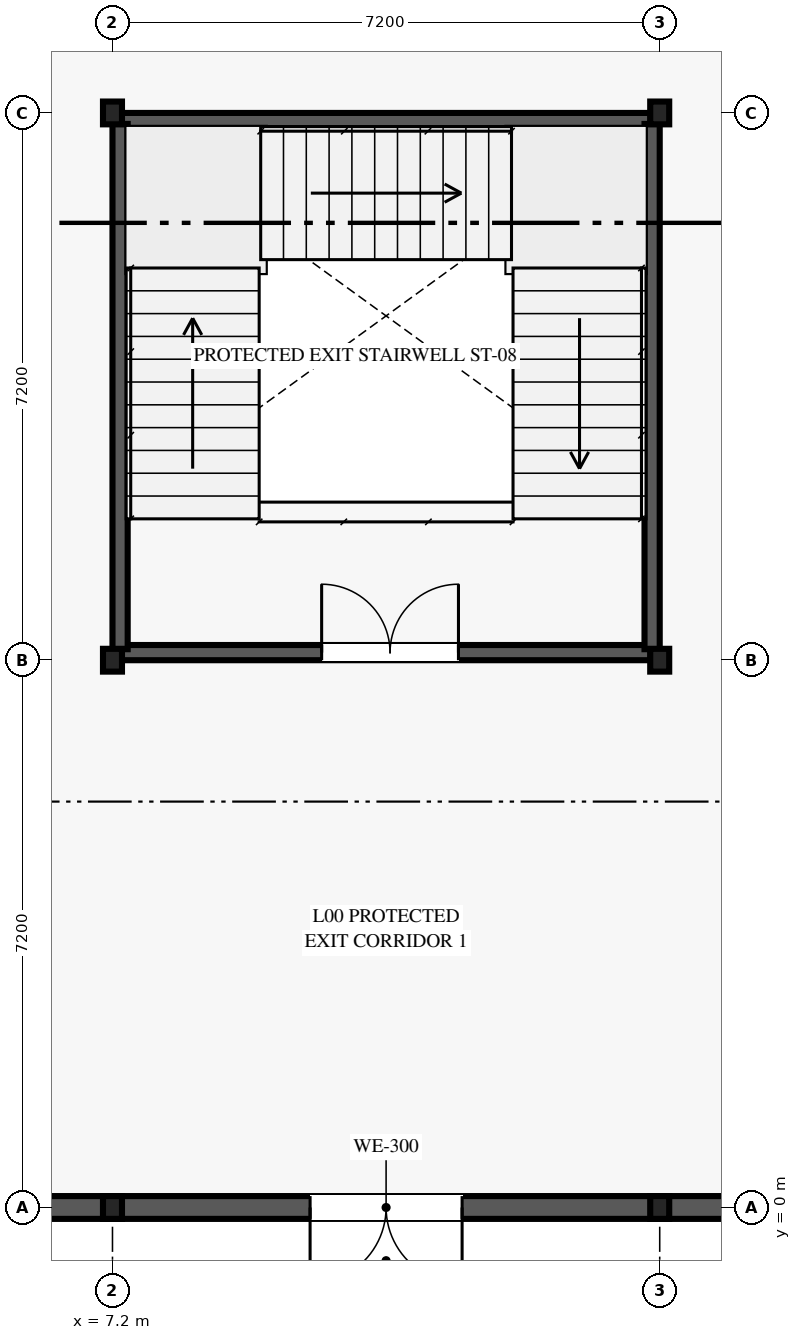
"""IFC4 building model, lengths in metres.
Left out: names, types, materials, properties, quantities, classifications, styles, units other than length and angle.
Written with IfcOpenShell. Run it as: python <this file> out.ifc"""

import sys

from ifc_helpers import new_model, si_unit, direction, frame, frame_2d, origin, origin_2d, place, context, subcontext, project, spatial, rectangle, i_section, extrude, element, fill, save


model = new_model("IFC4")
c1 = context("Model", 3, precision=1e-05, world=origin(), true_north=direction((0.0, 1.0)))
c2 = subcontext(c1, "Body", "Model", "MODEL_VIEW")
j1 = project(units=[si_unit("LENGTHUNIT", "METRE"), si_unit("PLANEANGLEUNIT", "RADIAN")], contexts=[c1])
p1 = place(None, origin())
s1 = spatial("IfcSite", under=j1, at=p1, CompositionType="ELEMENT")
p2 = place(p1, origin())
s2 = spatial("IfcBuilding", under=s1, at=p2, CompositionType="ELEMENT")
p3 = place(p2, origin())
s3 = spatial("IfcBuildingStorey", under=s2, at=p3, CompositionType="ELEMENT", Elevation=0.0)
for number, where, z_axis, x_axis in (
    (1, (7.2, 0.0, 0.0), (0.0, 0.0, 1.0), (1.0, 0.0, 0.0)),
    (2, (7.2, 7.2, 0.0), (0.0, 0.0, 1.0), (1.0, 0.0, 0.0)),
    (3, (7.2, 14.4, 0.0), (0.0, 0.0, 1.0), (1.0, 0.0, 0.0)),
    (4, (14.4, 0.0, 0.0), (0.0, 0.0, 1.0), (1.0, 0.0, 0.0)),
    (5, (14.4, 7.2, 0.0), (0.0, 0.0, 1.0), (1.0, 0.0, 0.0)),
    (6, (14.4, 14.4, 0.0), (0.0, 0.0, 1.0), (1.0, 0.0, 0.0)),
):
    element("IfcColumn", number, at=place(p3, frame(where, z_axis=z_axis, x_axis=x_axis)), inside=s3, PredefinedType="COLUMN", context=c2, shape_type="SweptSolid", body=[
        extrude(i_section(OverallWidth=0.25, OverallDepth=0.3, WebThickness=0.01, FlangeThickness=0.01, at=origin_2d()), origin(), (0.0, 0.0, 1.0), 5.4),
    ])
p4 = place(p3, frame((0.01, 0.0, 0.0), z_axis=(0.0, 0.0, 1.0), x_axis=(1.0, 0.0, 0.0)))
e7 = element("IfcWall", 7, at=p4, inside=s3, PredefinedType="SOLIDWALL", context=c2, shape_type="SweptSolid", body=[
    extrude(rectangle(XDim=7.18, YDim=0.3, at=frame_2d((3.59, 0.0))), origin(), (0.0, 0.0, 1.0), 5.16),
])
p5 = place(p4, frame((2.99, 0.0, 1.85)))
e8 = element("IfcOpeningElement", 8, at=p5, cuts=e7, PredefinedType="OPENING", context=c2, shape_type="SweptSolid", body=[
    extrude(rectangle(XDim=1.2, YDim=0.65, at=frame_2d((0.6, 0.325))), frame((0.0, 0.16, 0.0), z_axis=(0.0, -1.0, 0.0), x_axis=(1.0, 0.0, 0.0)), (0.0, 0.0, 1.0), 0.32),
])
p6 = place(p3, frame((14.39, 0.0, 0.0), z_axis=(0.0, 0.0, 1.0), x_axis=(-1.0, 0.0, 0.0)))
e9 = element("IfcWall", 9, at=p6, inside=s3, PredefinedType="SOLIDWALL", context=c2, shape_type="SweptSolid", body=[
    extrude(rectangle(XDim=7.18, YDim=0.3, at=frame_2d((3.59, 0.0))), origin(), (0.0, 0.0, 1.0), 5.16),
])
p7 = place(p6, frame((2.59, 0.0, 0.0)))
e10 = element("IfcOpeningElement", 10, at=p7, cuts=e9, PredefinedType="OPENING", context=c2, shape_type="SweptSolid", body=[
    extrude(rectangle(XDim=2.0, YDim=2.3, at=frame_2d((1.0, 1.15))), frame((0.0, 0.16, 0.0), z_axis=(0.0, -1.0, 0.0), x_axis=(1.0, 0.0, 0.0)), (0.0, 0.0, 1.0), 0.32),
])
p8 = place(p3, frame((14.41, 0.0, 0.0), z_axis=(0.0, 0.0, 1.0), x_axis=(1.0, 0.0, 0.0)))
e11 = element("IfcWall", 11, at=p8, inside=s3, PredefinedType="SOLIDWALL", context=c2, shape_type="SweptSolid", body=[
    extrude(rectangle(XDim=7.18, YDim=0.3, at=frame_2d((3.59, 0.0))), origin(), (0.0, 0.0, 1.0), 5.16),
])
p9 = place(p8, frame((2.99, 0.0, 1.85)))
e12 = element("IfcOpeningElement", 12, at=p9, cuts=e11, PredefinedType="OPENING", context=c2, shape_type="SweptSolid", body=[
    extrude(rectangle(XDim=1.2, YDim=0.65, at=frame_2d((0.6, 0.325))), frame((0.0, 0.16, 0.0), z_axis=(0.0, -1.0, 0.0), x_axis=(1.0, 0.0, 0.0)), (0.0, 0.0, 1.0), 0.32),
])
p10 = place(p3, frame((7.32, 7.3, 0.0), z_axis=(0.0, 0.0, 1.0), x_axis=(1.0, 0.0, 0.0)))
e13 = element("IfcWall", 13, at=p10, inside=s3, PredefinedType="SHEAR", context=c2, shape_type="SweptSolid", body=[
    extrude(rectangle(XDim=6.96, YDim=0.2, at=frame_2d((3.48, 0.0))), origin(), (0.0, 0.0, 1.0), 5.16),
])
p11 = place(p10, frame((2.632, 0.0, 0.0)))
e14 = element("IfcOpeningElement", 14, at=p11, cuts=e13, PredefinedType="OPENING", context=c2, shape_type="SweptSolid", body=[
    extrude(rectangle(XDim=1.8, YDim=2.2, at=frame_2d((0.9, 1.1))), frame((0.0, 0.11, 0.0), z_axis=(0.0, -1.0, 0.0), x_axis=(1.0, 0.0, 0.0)), (0.0, 0.0, 1.0), 0.22),
])
p12 = place(p3, frame((7.32, 14.3, 0.0), z_axis=(0.0, 0.0, 1.0), x_axis=(1.0, 0.0, 0.0)))
e15 = element("IfcWall", 15, at=p12, inside=s3, PredefinedType="SHEAR", context=c2, shape_type="SweptSolid", body=[
    extrude(rectangle(XDim=6.96, YDim=0.2, at=frame_2d((3.48, 0.0))), origin(), (0.0, 0.0, 1.0), 5.16),
])
for number, where, z_axis, x_axis in (
    (16, (7.3, 7.345, 0.0), (0.0, 0.0, 1.0), (0.0, 1.0, 0.0)),
    (17, (14.3, 7.345, 0.0), (0.0, 0.0, 1.0), (0.0, 1.0, 0.0)),
):
    element("IfcWall", number, at=place(p3, frame(where, z_axis=z_axis, x_axis=x_axis)), inside=s3, PredefinedType="SHEAR", context=c2, shape_type="SweptSolid", body=[
        extrude(rectangle(XDim=6.91, YDim=0.2, at=frame_2d((3.455, 0.0))), origin(), (0.0, 0.0, 1.0), 5.16),
    ])
p13 = place(p7, origin())
e18 = element("IfcDoor", 18, at=p13, inside=s3, OperationType="DOUBLE_DOOR_SINGLE_SWING", PredefinedType="DOOR", context=c2, shape_type="SweptSolid", body=[
    extrude(rectangle(XDim=2.0, YDim=2.3, at=frame_2d((1.0, 1.15))), frame((0.0, 0.025, 0.0), z_axis=(0.0, -1.0, 0.0), x_axis=(1.0, 0.0, 0.0)), (0.0, 0.0, 1.0), 0.05),
])
fill(e10, e18)
p14 = place(p11, origin())
e19 = element("IfcDoor", 19, at=p14, inside=s3, OperationType="DOUBLE_DOOR_SINGLE_SWING", PredefinedType="DOOR", context=c2, shape_type="SweptSolid", body=[
    extrude(rectangle(XDim=1.8, YDim=2.2, at=frame_2d((0.9, 1.1))), frame((0.0, 0.025, 0.0), z_axis=(0.0, -1.0, 0.0), x_axis=(1.0, 0.0, 0.0)), (0.0, 0.0, 1.0), 0.05),
])
fill(e14, e19)
save(model, sys.argv[1])
